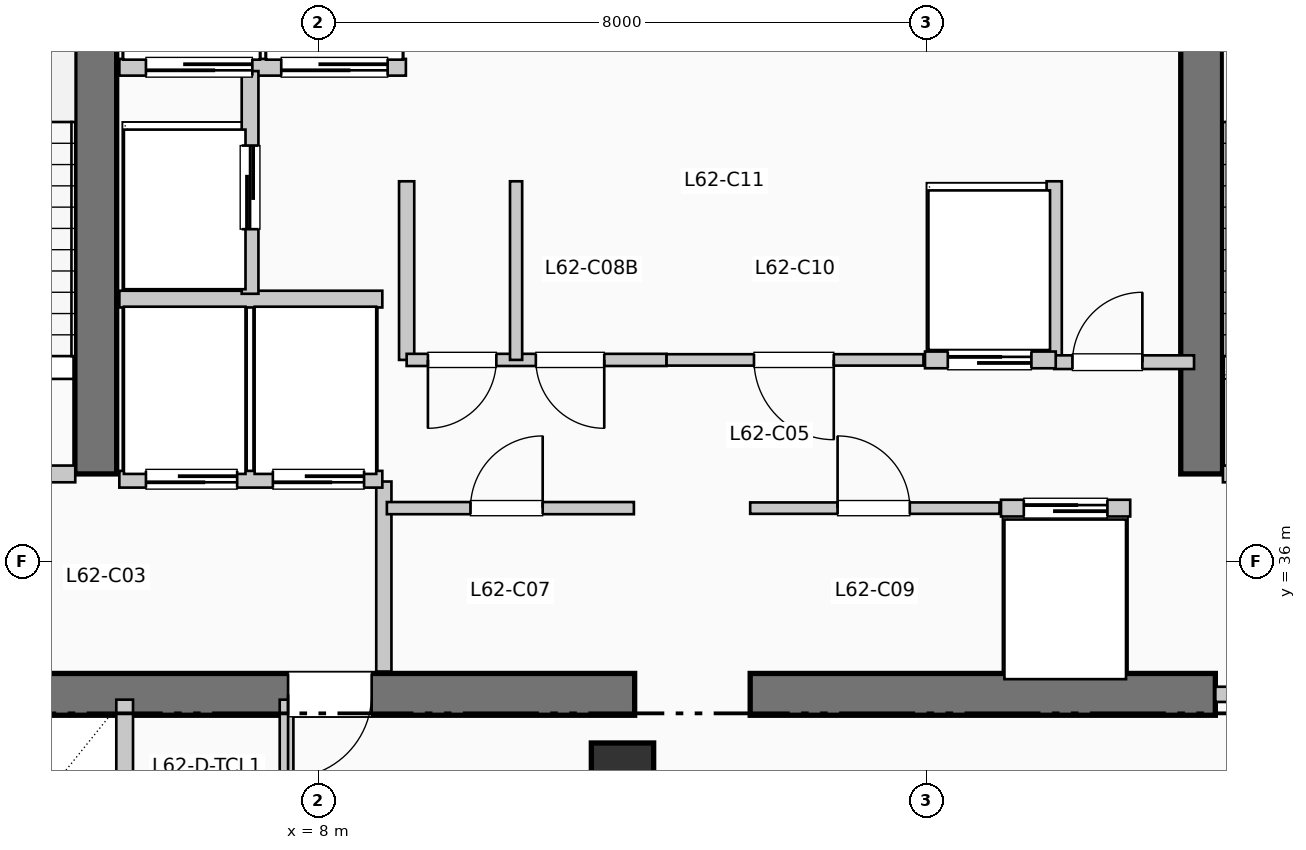
"""IFC4 building model, lengths in metres.
Left out: names, types, materials, properties, quantities, classifications, styles, units other than length and angle.
Written with IfcOpenShell. Run it as: python <this file> out.ifc"""

import sys

from ifc_helpers import new_model, si_unit, direction, frame, frame_2d, origin, origin_2d, place, context, subcontext, project, spatial, rectangle, extrude, element, fill, save


model = new_model("IFC4")
c1 = context("Model", 3, precision=1e-05, world=origin(), true_north=direction((0.0, 1.0)))
c2 = subcontext(c1, "Body", "Model", "MODEL_VIEW")
j1 = project(units=[si_unit("LENGTHUNIT", "METRE"), si_unit("PLANEANGLEUNIT", "RADIAN")], contexts=[c1])
p1 = place(None, origin())
s1 = spatial("IfcSite", under=j1, at=p1, CompositionType="ELEMENT")
p2 = place(p1, origin())
s2 = spatial("IfcBuilding", under=s1, at=p2, CompositionType="ELEMENT")
p3 = place(p2, frame((0.0, 0.0, 256.41)))
s3 = spatial("IfcBuildingStorey", under=s2, at=p3, CompositionType="ELEMENT", Elevation=256.41)
p4 = place(p3, frame((1.45, 34.25, 0.0), z_axis=(0.0, 0.0, 1.0), x_axis=(1.0, 0.0, 0.0)))
e1 = element("IfcWall", 1, at=p4, inside=s3, PredefinedType="SHEAR", context=c2, shape_type="SweptSolid", body=[
    extrude(rectangle(XDim=10.71, YDim=0.55, at=frame_2d((5.355, 0.0))), origin(), (0.0, 0.0, 1.0), 3.96),
])
p5 = place(p4, frame((7.25, 0.0, 0.0), z_axis=(0.0, 0.0, 1.0), x_axis=(-1.0, 0.0, 0.0)))
e2 = element("IfcOpeningElement", 2, at=p5, cuts=e1, PredefinedType="OPENING", context=c2, shape_type="SweptSolid", body=[
    extrude(rectangle(XDim=1.1, YDim=2.15, at=frame_2d((0.55, 1.075))), frame((0.0, 0.285, 0.0), z_axis=(0.0, -1.0, 0.0), x_axis=(1.0, 0.0, 0.0)), (0.0, 0.0, 1.0), 0.57),
])
p6 = place(p3, frame((13.68, 34.25, 0.0), z_axis=(0.0, 0.0, 1.0), x_axis=(1.0, 0.0, 0.0)))
e3 = element("IfcWall", 3, at=p6, inside=s3, PredefinedType="SHEAR", context=c2, shape_type="SweptSolid", body=[
    extrude(rectangle(XDim=6.12, YDim=0.55, at=frame_2d((3.06, 0.0))), origin(), (0.0, 0.0, 1.0), 3.96),
])
for number, where, z_axis, x_axis in (
    (4, (5.07, 37.15, 0.0), (0.0, 0.0, 1.0), (0.0, 1.0, 0.0)),
    (5, (19.62, 37.15, 0.0), (0.0, 0.0, 1.0), (0.0, 1.0, 0.0)),
):
    element("IfcWall", number, at=place(p3, frame(where, z_axis=z_axis, x_axis=x_axis)), inside=s3, PredefinedType="SHEAR", context=c2, shape_type="SweptSolid", body=[
        extrude(rectangle(XDim=7.89, YDim=0.55, at=frame_2d((3.945, 0.0))), origin(), (0.0, 0.0, 1.0), 3.96),
    ])
p7 = place(p3, frame((12.0, 33.2, 0.0), z_axis=(0.0, 0.0, 1.0), x_axis=(1.0, 0.0, 0.0)))
e6 = element("IfcColumn", 6, at=p7, inside=s3, PredefinedType="COLUMN", context=c2, shape_type="SweptSolid", body=[
    extrude(rectangle(XDim=0.82, YDim=0.82, at=origin_2d()), origin(), (0.0, 0.0, 1.0), 3.96),
])
p8 = place(p3, frame((1.65, 37.15, 0.0), z_axis=(0.0, 0.0, 1.0), x_axis=(1.0, 0.0, 0.0)))
e7 = element("IfcWall", 7, at=p8, inside=s3, PredefinedType="PARTITIONING", context=c2, shape_type="SweptSolid", body=[
    extrude(rectangle(XDim=3.15, YDim=0.22, at=frame_2d((1.575, 0.0))), origin(), (0.0, 0.0, 1.0), 3.71),
])
p9 = place(p8, frame((2.05, 0.0, 0.0), z_axis=(0.0, 0.0, 1.0), x_axis=(-1.0, 0.0, 0.0)))
e8 = element("IfcOpeningElement", 8, at=p9, cuts=e7, PredefinedType="OPENING", context=c2, shape_type="SweptSolid", body=[
    extrude(rectangle(XDim=1.05, YDim=2.15, at=frame_2d((0.525, 1.075))), frame((0.0, 0.12, 0.0), z_axis=(0.0, -1.0, 0.0), x_axis=(1.0, 0.0, 0.0)), (0.0, 0.0, 1.0), 0.24),
])
p10 = place(p3, frame((8.86, 34.55, 0.0), z_axis=(0.0, 0.0, 1.0), x_axis=(0.0, 1.0, 0.0)))
e9 = element("IfcWall", 9, at=p10, inside=s3, PredefinedType="PARTITIONING", context=c2, shape_type="SweptSolid", body=[
    extrude(rectangle(XDim=2.5, YDim=0.2, at=frame_2d((1.25, 0.0))), origin(), (0.0, 0.0, 1.0), 3.71),
])
p11 = place(p3, frame((19.9, 37.15, 0.0), z_axis=(0.0, 0.0, 1.0), x_axis=(1.0, 0.0, 0.0)))
e10 = element("IfcWall", 10, at=p11, inside=s3, PredefinedType="PARTITIONING", context=c2, shape_type="SweptSolid", body=[
    extrude(rectangle(XDim=3.15, YDim=0.22, at=frame_2d((1.575, 0.0))), origin(), (0.0, 0.0, 1.0), 3.71),
])
p12 = place(p11, frame((2.05, 0.0, 0.0), z_axis=(0.0, 0.0, 1.0), x_axis=(-1.0, 0.0, 0.0)))
e11 = element("IfcOpeningElement", 11, at=p12, cuts=e10, PredefinedType="OPENING", context=c2, shape_type="SweptSolid", body=[
    extrude(rectangle(XDim=1.05, YDim=2.15, at=frame_2d((0.525, 1.075))), frame((0.0, 0.12, 0.0), z_axis=(0.0, -1.0, 0.0), x_axis=(1.0, 0.0, 0.0)), (0.0, 0.0, 1.0), 0.24),
])
p13 = place(p3, frame((19.8, 34.25, 0.0), z_axis=(0.0, 0.0, 1.0), x_axis=(1.0, 0.0, 0.0)))
e12 = element("IfcWall", 12, at=p13, inside=s3, PredefinedType="PARTITIONING", context=c2, shape_type="SweptSolid", body=[
    extrude(rectangle(XDim=3.25, YDim=0.2, at=frame_2d((1.625, 0.0))), origin(), (0.0, 0.0, 1.0), 3.71),
])
p14 = place(p13, frame((2.15, 0.0, 0.0), z_axis=(0.0, 0.0, 1.0), x_axis=(-1.0, 0.0, 0.0)))
e13 = element("IfcOpeningElement", 13, at=p14, cuts=e12, PredefinedType="OPENING", context=c2, shape_type="SweptSolid", body=[
    extrude(rectangle(XDim=1.1, YDim=2.15, at=frame_2d((0.55, 1.075))), frame((0.0, 0.11, 0.0), z_axis=(0.0, -1.0, 0.0), x_axis=(1.0, 0.0, 0.0)), (0.0, 0.0, 1.0), 0.22),
])
p15 = place(p3, frame((5.38, 37.08, 0.0), z_axis=(0.0, 0.0, 1.0), x_axis=(1.0, 0.0, 0.0)))
e14 = element("IfcWall", 14, at=p15, inside=s3, PredefinedType="PARTITIONING", context=c2, shape_type="SweptSolid", body=[
    extrude(rectangle(XDim=3.46, YDim=0.22, at=frame_2d((1.73, 0.0))), origin(), (0.0, 0.0, 1.0), 3.71),
])
p16 = place(p15, frame((1.55, 0.0, 0.0), z_axis=(0.0, 0.0, 1.0), x_axis=(-1.0, 0.0, 0.0)))
e15 = element("IfcOpeningElement", 15, at=p16, cuts=e14, PredefinedType="OPENING", context=c2, shape_type="SweptSolid", body=[
    extrude(rectangle(XDim=1.2, YDim=2.2, at=frame_2d((0.6, 1.1))), frame((0.0, 0.12, 0.0), z_axis=(0.0, -1.0, 0.0), x_axis=(1.0, 0.0, 0.0)), (0.0, 0.0, 1.0), 0.24),
])
p17 = place(p15, frame((3.22, 0.0, 0.0), z_axis=(0.0, 0.0, 1.0), x_axis=(-1.0, 0.0, 0.0)))
e16 = element("IfcOpeningElement", 16, at=p17, cuts=e14, PredefinedType="OPENING", context=c2, shape_type="SweptSolid", body=[
    extrude(rectangle(XDim=1.2, YDim=2.2, at=frame_2d((0.6, 1.1))), frame((0.0, 0.12, 0.0), z_axis=(0.0, -1.0, 0.0), x_axis=(1.0, 0.0, 0.0)), (0.0, 0.0, 1.0), 0.24),
])
p18 = place(p3, frame((5.38, 39.45, 0.0), z_axis=(0.0, 0.0, 1.0), x_axis=(1.0, 0.0, 0.0)))
e17 = element("IfcWall", 17, at=p18, inside=s3, PredefinedType="PARTITIONING", context=c2, shape_type="SweptSolid", body=[
    extrude(rectangle(XDim=3.46, YDim=0.22, at=frame_2d((1.73, 0.0))), origin(), (0.0, 0.0, 1.0), 3.71),
])
p19 = place(p3, frame((5.38, 42.5, 0.0), z_axis=(0.0, 0.0, 1.0), x_axis=(1.0, 0.0, 0.0)))
e18 = element("IfcWall", 18, at=p19, inside=s3, PredefinedType="PARTITIONING", context=c2, shape_type="SweptSolid", body=[
    extrude(rectangle(XDim=3.77, YDim=0.22, at=frame_2d((1.885, 0.0))), origin(), (0.0, 0.0, 1.0), 3.71),
])
p20 = place(p19, frame((1.75, 0.0, 0.0), z_axis=(0.0, 0.0, 1.0), x_axis=(-1.0, 0.0, 0.0)))
e19 = element("IfcOpeningElement", 19, at=p20, cuts=e18, PredefinedType="OPENING", context=c2, shape_type="SweptSolid", body=[
    extrude(rectangle(XDim=1.4, YDim=2.2, at=frame_2d((0.7, 1.1))), frame((0.0, 0.12, 0.0), z_axis=(0.0, -1.0, 0.0), x_axis=(1.0, 0.0, 0.0)), (0.0, 0.0, 1.0), 0.24),
])
p21 = place(p19, frame((3.53, 0.0, 0.0), z_axis=(0.0, 0.0, 1.0), x_axis=(-1.0, 0.0, 0.0)))
e20 = element("IfcOpeningElement", 20, at=p21, cuts=e18, PredefinedType="OPENING", context=c2, shape_type="SweptSolid", body=[
    extrude(rectangle(XDim=1.4, YDim=2.2, at=frame_2d((0.7, 1.1))), frame((0.0, 0.12, 0.0), z_axis=(0.0, -1.0, 0.0), x_axis=(1.0, 0.0, 0.0)), (0.0, 0.0, 1.0), 0.24),
])
p22 = place(p3, frame((7.1, 39.52, 0.0), z_axis=(0.0, 0.0, 1.0), x_axis=(0.0, 1.0, 0.0)))
e21 = element("IfcWall", 21, at=p22, inside=s3, PredefinedType="PARTITIONING", context=c2, shape_type="SweptSolid", body=[
    extrude(rectangle(XDim=2.93, YDim=0.22, at=frame_2d((1.465, 0.0))), origin(), (0.0, 0.0, 1.0), 3.71),
])
p23 = place(p22, frame((0.85, 0.0, 0.0)))
e22 = element("IfcOpeningElement", 22, at=p23, cuts=e21, PredefinedType="OPENING", context=c2, shape_type="SweptSolid", body=[
    extrude(rectangle(XDim=1.1, YDim=2.2, at=frame_2d((0.55, 1.1))), frame((0.0, 0.12, 0.0), z_axis=(0.0, -1.0, 0.0), x_axis=(1.0, 0.0, 0.0)), (0.0, 0.0, 1.0), 0.24),
])
p24 = place(p3, frame((5.45, 31.8, 0.0), z_axis=(0.0, 0.0, 1.0), x_axis=(0.0, 1.0, 0.0)))
e23 = element("IfcWall", 23, at=p24, inside=s3, PredefinedType="PARTITIONING", context=c2, shape_type="SweptSolid", body=[
    extrude(rectangle(XDim=2.38, YDim=0.22, at=frame_2d((1.19, 0.0))), origin(), (0.0, 0.0, 1.0), 3.71),
])
for number, where, z_axis, x_axis in (
    (24, (9.16, 38.65, 0.0), (0.0, 0.0, 1.0), (0.0, 1.0, 0.0)),
    (25, (17.68, 38.65, 0.0), (0.0, 0.0, 1.0), (0.0, 1.0, 0.0)),
):
    element("IfcWall", number, at=place(p3, frame(where, z_axis=z_axis, x_axis=x_axis)), inside=s3, PredefinedType="PARTITIONING", context=c2, shape_type="SweptSolid", body=[
        extrude(rectangle(XDim=2.35, YDim=0.2, at=frame_2d((1.175, 0.0))), origin(), (0.0, 0.0, 1.0), 3.71),
    ])
p25 = place(p3, frame((17.68, 38.62, 0.0), z_axis=(0.0, 0.0, 1.0), x_axis=(1.0, 0.0, 0.0)))
e26 = element("IfcWall", 26, at=p25, inside=s3, PredefinedType="PARTITIONING", context=c2, shape_type="SweptSolid", body=[
    extrude(rectangle(XDim=1.84, YDim=0.18, at=frame_2d((0.92, 0.0))), origin(), (0.0, 0.0, 1.0), 3.71),
])
p26 = place(p25, frame((0.24, 0.0, 0.0)))
e27 = element("IfcOpeningElement", 27, at=p26, cuts=e26, PredefinedType="OPENING", context=c2, shape_type="SweptSolid", body=[
    extrude(rectangle(XDim=0.92, YDim=2.1, at=frame_2d((0.46, 1.05))), frame((0.0, 0.1, 0.0), z_axis=(0.0, -1.0, 0.0), x_axis=(1.0, 0.0, 0.0)), (0.0, 0.0, 1.0), 0.2),
])
p27 = place(p3, frame((7.58, 31.82, 0.0), z_axis=(0.0, 0.0, 1.0), x_axis=(0.0, 1.0, 0.0)))
e28 = element("IfcWall", 28, at=p27, inside=s3, PredefinedType="PLUMBINGWALL", context=c2, shape_type="SweptSolid", body=[
    extrude(rectangle(XDim=2.36, YDim=0.18, at=frame_2d((1.18, 0.0))), origin(), (0.0, 0.0, 1.0), 3.71),
])
p28 = place(p3, frame((8.9, 36.7, 0.0), z_axis=(0.0, 0.0, 1.0), x_axis=(1.0, 0.0, 0.0)))
e29 = element("IfcWall", 29, at=p28, inside=s3, PredefinedType="PARTITIONING", context=c2, shape_type="SweptSolid", body=[
    extrude(rectangle(XDim=3.25, YDim=0.16, at=frame_2d((1.625, 0.0))), origin(), (0.0, 0.0, 1.0), 3.71),
])
p29 = place(p28, frame((1.1, 0.0, 0.0)))
e30 = element("IfcOpeningElement", 30, at=p29, cuts=e29, PredefinedType="OPENING", context=c2, shape_type="SweptSolid", body=[
    extrude(rectangle(XDim=0.95, YDim=2.15, at=frame_2d((0.475, 1.075))), frame((0.0, 0.09, 0.0), z_axis=(0.0, -1.0, 0.0), x_axis=(1.0, 0.0, 0.0)), (0.0, 0.0, 1.0), 0.18),
])
p30 = place(p3, frame((9.16, 38.65, 0.0), z_axis=(0.0, 0.0, 1.0), x_axis=(1.0, 0.0, 0.0)))
e31 = element("IfcWall", 31, at=p30, inside=s3, PredefinedType="PARTITIONING", context=c2, shape_type="SweptSolid", body=[
    extrude(rectangle(XDim=3.42, YDim=0.16, at=frame_2d((1.71, 0.0))), origin(), (0.0, 0.0, 1.0), 3.71),
])
p31 = place(p30, frame((1.18, 0.0, 0.0), z_axis=(0.0, 0.0, 1.0), x_axis=(-1.0, 0.0, 0.0)))
e32 = element("IfcOpeningElement", 32, at=p31, cuts=e31, PredefinedType="OPENING", context=c2, shape_type="SweptSolid", body=[
    extrude(rectangle(XDim=0.9, YDim=2.15, at=frame_2d((0.45, 1.075))), frame((0.0, 0.09, 0.0), z_axis=(0.0, -1.0, 0.0), x_axis=(1.0, 0.0, 0.0)), (0.0, 0.0, 1.0), 0.18),
])
p32 = place(p30, frame((2.6, 0.0, 0.0), z_axis=(0.0, 0.0, 1.0), x_axis=(-1.0, 0.0, 0.0)))
e33 = element("IfcOpeningElement", 33, at=p32, cuts=e31, PredefinedType="OPENING", context=c2, shape_type="SweptSolid", body=[
    extrude(rectangle(XDim=0.9, YDim=2.15, at=frame_2d((0.45, 1.075))), frame((0.0, 0.09, 0.0), z_axis=(0.0, -1.0, 0.0), x_axis=(1.0, 0.0, 0.0)), (0.0, 0.0, 1.0), 0.18),
])
p33 = place(p3, frame((10.6, 38.65, 0.0), z_axis=(0.0, 0.0, 1.0), x_axis=(0.0, 1.0, 0.0)))
e34 = element("IfcWall", 34, at=p33, inside=s3, PredefinedType="PARTITIONING", context=c2, shape_type="SweptSolid", body=[
    extrude(rectangle(XDim=2.35, YDim=0.16, at=frame_2d((1.175, 0.0))), origin(), (0.0, 0.0, 1.0), 3.71),
])
p34 = place(p3, frame((13.68, 36.7, 0.0), z_axis=(0.0, 0.0, 1.0), x_axis=(1.0, 0.0, 0.0)))
e35 = element("IfcWall", 35, at=p34, inside=s3, PredefinedType="PARTITIONING", context=c2, shape_type="SweptSolid", body=[
    extrude(rectangle(XDim=3.28, YDim=0.15, at=frame_2d((1.64, 0.0))), origin(), (0.0, 0.0, 1.0), 3.71),
])
p35 = place(p34, frame((1.15, 0.0, 0.0)))
e36 = element("IfcOpeningElement", 36, at=p35, cuts=e35, PredefinedType="OPENING", context=c2, shape_type="SweptSolid", body=[
    extrude(rectangle(XDim=0.95, YDim=2.15, at=frame_2d((0.475, 1.075))), frame((0.0, 0.085, 0.0), z_axis=(0.0, -1.0, 0.0), x_axis=(1.0, 0.0, 0.0)), (0.0, 0.0, 1.0), 0.17),
])
p36 = place(p3, frame((12.58, 38.65, 0.0), z_axis=(0.0, 0.0, 1.0), x_axis=(1.0, 0.0, 0.0)))
e37 = element("IfcWall", 37, at=p36, inside=s3, PredefinedType="PARTITIONING", context=c2, shape_type="SweptSolid", body=[
    extrude(rectangle(XDim=3.38, YDim=0.15, at=frame_2d((1.69, 0.0))), origin(), (0.0, 0.0, 1.0), 3.71),
])
p37 = place(p36, frame((2.2, 0.0, 0.0), z_axis=(0.0, 0.0, 1.0), x_axis=(-1.0, 0.0, 0.0)))
e38 = element("IfcOpeningElement", 38, at=p37, cuts=e37, PredefinedType="OPENING", context=c2, shape_type="SweptSolid", body=[
    extrude(rectangle(XDim=1.05, YDim=2.15, at=frame_2d((0.525, 1.075))), frame((0.0, 0.085, 0.0), z_axis=(0.0, -1.0, 0.0), x_axis=(1.0, 0.0, 0.0)), (0.0, 0.0, 1.0), 0.17),
])
p38 = place(p3, frame((16.98, 36.7, 0.0), z_axis=(0.0, 0.0, 1.0), x_axis=(1.0, 0.0, 0.0)))
e39 = element("IfcWall", 39, at=p38, inside=s3, PredefinedType="PARTITIONING", context=c2, shape_type="SweptSolid", body=[
    extrude(rectangle(XDim=1.7, YDim=0.22, at=frame_2d((0.85, 0.0))), origin(), (0.0, 0.0, 1.0), 3.71),
])
p39 = place(p38, frame((0.3, 0.0, 0.0)))
e40 = element("IfcOpeningElement", 40, at=p39, cuts=e39, PredefinedType="OPENING", context=c2, shape_type="SweptSolid", body=[
    extrude(rectangle(XDim=1.1, YDim=2.2, at=frame_2d((0.55, 1.1))), frame((0.0, 0.12, 0.0), z_axis=(0.0, -1.0, 0.0), x_axis=(1.0, 0.0, 0.0)), (0.0, 0.0, 1.0), 0.24),
])
p40 = place(p3, frame((15.98, 38.65, 0.0), z_axis=(0.0, 0.0, 1.0), x_axis=(1.0, 0.0, 0.0)))
e41 = element("IfcWall", 41, at=p40, inside=s3, PredefinedType="PARTITIONING", context=c2, shape_type="SweptSolid", body=[
    extrude(rectangle(XDim=1.72, YDim=0.22, at=frame_2d((0.86, 0.0))), origin(), (0.0, 0.0, 1.0), 3.71),
])
p41 = place(p40, frame((0.3, 0.0, 0.0)))
e42 = element("IfcOpeningElement", 42, at=p41, cuts=e41, PredefinedType="OPENING", context=c2, shape_type="SweptSolid", body=[
    extrude(rectangle(XDim=1.1, YDim=2.2, at=frame_2d((0.55, 1.1))), frame((0.0, 0.12, 0.0), z_axis=(0.0, -1.0, 0.0), x_axis=(1.0, 0.0, 0.0)), (0.0, 0.0, 1.0), 0.24),
])
p42 = place(p5, origin())
e43 = element("IfcDoor", 43, at=p42, inside=s3, OperationType="SINGLE_SWING_LEFT", PredefinedType="DOOR", context=c2, shape_type="SweptSolid", body=[
    extrude(rectangle(XDim=1.1, YDim=2.15, at=frame_2d((0.55, 1.075))), frame((0.0, 0.025, 0.0), z_axis=(0.0, -1.0, 0.0), x_axis=(1.0, 0.0, 0.0)), (0.0, 0.0, 1.0), 0.05),
])
fill(e2, e43)
p43 = place(p16, origin())
e44 = element("IfcDoor", 44, at=p43, inside=s3, OperationType="SLIDING_TO_RIGHT", PredefinedType="DOOR", context=c2, shape_type="SweptSolid", body=[
    extrude(rectangle(XDim=1.2, YDim=2.2, at=frame_2d((0.6, 1.1))), frame((0.0, 0.025, 0.0), z_axis=(0.0, -1.0, 0.0), x_axis=(1.0, 0.0, 0.0)), (0.0, 0.0, 1.0), 0.05),
])
fill(e15, e44)
p44 = place(p17, origin())
e45 = element("IfcDoor", 45, at=p44, inside=s3, OperationType="SLIDING_TO_RIGHT", PredefinedType="DOOR", context=c2, shape_type="SweptSolid", body=[
    extrude(rectangle(XDim=1.2, YDim=2.2, at=frame_2d((0.6, 1.1))), frame((0.0, 0.025, 0.0), z_axis=(0.0, -1.0, 0.0), x_axis=(1.0, 0.0, 0.0)), (0.0, 0.0, 1.0), 0.05),
])
fill(e16, e45)
p45 = place(p20, origin())
e46 = element("IfcDoor", 46, at=p45, inside=s3, OperationType="SLIDING_TO_LEFT", PredefinedType="DOOR", context=c2, shape_type="SweptSolid", body=[
    extrude(rectangle(XDim=1.4, YDim=2.2, at=frame_2d((0.7, 1.1))), frame((0.0, 0.025, 0.0), z_axis=(0.0, -1.0, 0.0), x_axis=(1.0, 0.0, 0.0)), (0.0, 0.0, 1.0), 0.05),
])
fill(e19, e46)
p46 = place(p21, origin())
e47 = element("IfcDoor", 47, at=p46, inside=s3, OperationType="SLIDING_TO_LEFT", PredefinedType="DOOR", context=c2, shape_type="SweptSolid", body=[
    extrude(rectangle(XDim=1.4, YDim=2.2, at=frame_2d((0.7, 1.1))), frame((0.0, 0.025, 0.0), z_axis=(0.0, -1.0, 0.0), x_axis=(1.0, 0.0, 0.0)), (0.0, 0.0, 1.0), 0.05),
])
fill(e20, e47)
p47 = place(p23, origin())
e48 = element("IfcDoor", 48, at=p47, inside=s3, OperationType="SLIDING_TO_LEFT", PredefinedType="DOOR", context=c2, shape_type="SweptSolid", body=[
    extrude(rectangle(XDim=1.1, YDim=2.2, at=frame_2d((0.55, 1.1))), frame((0.0, 0.025, 0.0), z_axis=(0.0, -1.0, 0.0), x_axis=(1.0, 0.0, 0.0)), (0.0, 0.0, 1.0), 0.05),
])
fill(e22, e48)
p48 = place(p26, origin())
e49 = element("IfcDoor", 49, at=p48, inside=s3, OperationType="SINGLE_SWING_RIGHT", PredefinedType="DOOR", context=c2, shape_type="SweptSolid", body=[
    extrude(rectangle(XDim=0.92, YDim=2.1, at=frame_2d((0.46, 1.05))), frame((0.0, 0.025, 0.0), z_axis=(0.0, -1.0, 0.0), x_axis=(1.0, 0.0, 0.0)), (0.0, 0.0, 1.0), 0.05),
])
fill(e27, e49)
p49 = place(p29, origin())
e50 = element("IfcDoor", 50, at=p49, inside=s3, OperationType="SINGLE_SWING_RIGHT", PredefinedType="DOOR", context=c2, shape_type="SweptSolid", body=[
    extrude(rectangle(XDim=0.95, YDim=2.15, at=frame_2d((0.475, 1.075))), frame((0.0, 0.025, 0.0), z_axis=(0.0, -1.0, 0.0), x_axis=(1.0, 0.0, 0.0)), (0.0, 0.0, 1.0), 0.05),
])
fill(e30, e50)
p50 = place(p31, origin())
e51 = element("IfcDoor", 51, at=p50, inside=s3, OperationType="SINGLE_SWING_LEFT", PredefinedType="DOOR", context=c2, shape_type="SweptSolid", body=[
    extrude(rectangle(XDim=0.9, YDim=2.15, at=frame_2d((0.45, 1.075))), frame((0.0, 0.025, 0.0), z_axis=(0.0, -1.0, 0.0), x_axis=(1.0, 0.0, 0.0)), (0.0, 0.0, 1.0), 0.05),
])
fill(e32, e51)
p51 = place(p32, origin())
e52 = element("IfcDoor", 52, at=p51, inside=s3, OperationType="SINGLE_SWING_RIGHT", PredefinedType="DOOR", context=c2, shape_type="SweptSolid", body=[
    extrude(rectangle(XDim=0.9, YDim=2.15, at=frame_2d((0.45, 1.075))), frame((0.0, 0.025, 0.0), z_axis=(0.0, -1.0, 0.0), x_axis=(1.0, 0.0, 0.0)), (0.0, 0.0, 1.0), 0.05),
])
fill(e33, e52)
p52 = place(p35, origin())
e53 = element("IfcDoor", 53, at=p52, inside=s3, OperationType="SINGLE_SWING_LEFT", PredefinedType="DOOR", context=c2, shape_type="SweptSolid", body=[
    extrude(rectangle(XDim=0.95, YDim=2.15, at=frame_2d((0.475, 1.075))), frame((0.0, 0.025, 0.0), z_axis=(0.0, -1.0, 0.0), x_axis=(1.0, 0.0, 0.0)), (0.0, 0.0, 1.0), 0.05),
])
fill(e36, e53)
p53 = place(p37, origin())
e54 = element("IfcDoor", 54, at=p53, inside=s3, OperationType="SINGLE_SWING_RIGHT", PredefinedType="DOOR", context=c2, shape_type="SweptSolid", body=[
    extrude(rectangle(XDim=1.05, YDim=2.15, at=frame_2d((0.525, 1.075))), frame((0.0, 0.025, 0.0), z_axis=(0.0, -1.0, 0.0), x_axis=(1.0, 0.0, 0.0)), (0.0, 0.0, 1.0), 0.05),
])
fill(e38, e54)
p54 = place(p39, origin())
e55 = element("IfcDoor", 55, at=p54, inside=s3, OperationType="SLIDING_TO_LEFT", PredefinedType="DOOR", context=c2, shape_type="SweptSolid", body=[
    extrude(rectangle(XDim=1.1, YDim=2.2, at=frame_2d((0.55, 1.1))), frame((0.0, 0.025, 0.0), z_axis=(0.0, -1.0, 0.0), x_axis=(1.0, 0.0, 0.0)), (0.0, 0.0, 1.0), 0.05),
])
fill(e40, e55)
p55 = place(p41, origin())
e56 = element("IfcDoor", 56, at=p55, inside=s3, OperationType="SLIDING_TO_LEFT", PredefinedType="DOOR", context=c2, shape_type="SweptSolid", body=[
    extrude(rectangle(XDim=1.1, YDim=2.2, at=frame_2d((0.55, 1.1))), frame((0.0, 0.025, 0.0), z_axis=(0.0, -1.0, 0.0), x_axis=(1.0, 0.0, 0.0)), (0.0, 0.0, 1.0), 0.05),
])
fill(e42, e56)
save(model, sys.argv[1])
